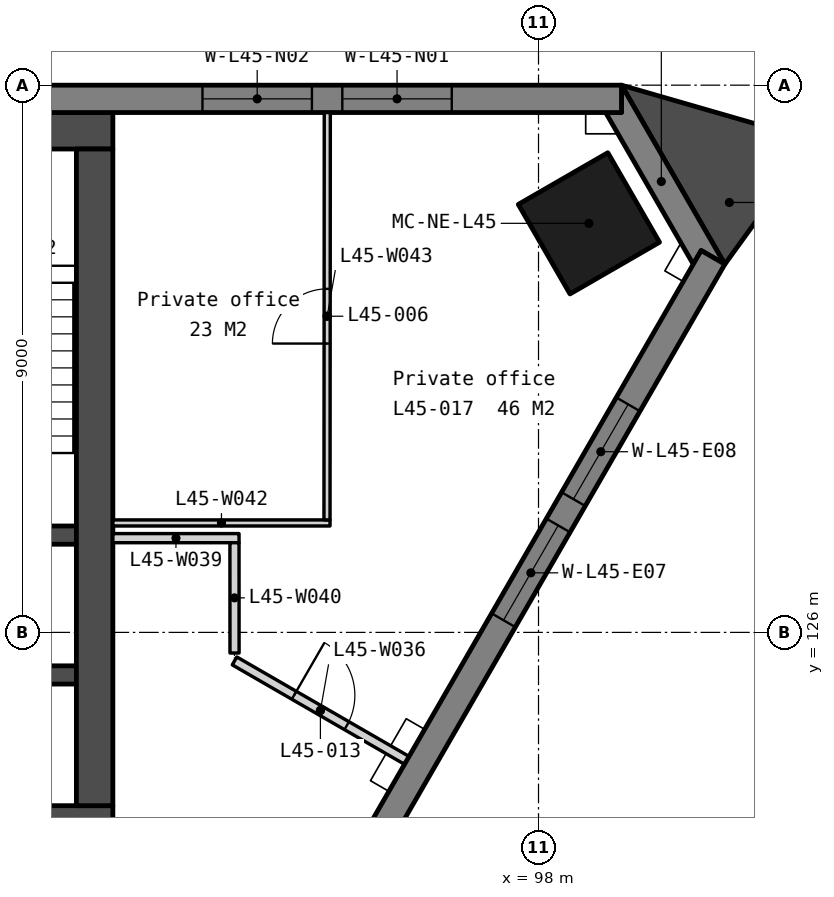
"""IFC4 building model, lengths in metres.
Left out: names, types, materials, properties, quantities, classifications, styles, units other than length and angle.
Written with IfcOpenShell. Run it as: python <this file> out.ifc"""

import sys

from ifc_helpers import new_model, si_unit, direction, frame, frame_2d, origin, origin_2d, place, context, subcontext, project, spatial, polyline, rectangle, outline, extrude, element, fill, save


model = new_model("IFC4")
c1 = context("Model", 3, precision=1e-05, world=origin(), true_north=direction((0.0, 1.0)))
c2 = subcontext(c1, "Body", "Model", "MODEL_VIEW")
j1 = project(units=[si_unit("LENGTHUNIT", "METRE"), si_unit("PLANEANGLEUNIT", "RADIAN")], contexts=[c1])
p1 = place(None, origin())
s1 = spatial("IfcSite", under=j1, at=p1, CompositionType="ELEMENT")
p2 = place(p1, origin())
s2 = spatial("IfcBuilding", under=s1, at=p2, CompositionType="ELEMENT")
p3 = place(p2, frame((0.0, 0.0, 180.2)))
s3 = spatial("IfcBuildingStorey", under=s2, at=p3, CompositionType="ELEMENT", Elevation=180.2)
p4 = place(p3, frame((98.829, 132.728, 0.0), z_axis=(0.0, 0.0, 1.0), x_axis=(-0.5, 0.866025403784, 0.0)))
e1 = element("IfcColumn", 1, at=p4, inside=s3, PredefinedType="COLUMN", context=c2, shape_type="SweptSolid", body=[
    extrude(rectangle(XDim=1.7, YDim=1.7, at=origin_2d()), origin(), (0.0, 0.0, 1.0), 3.9),
])
p5 = place(p3, frame((69.0, 134.25, 0.0), z_axis=(0.0, 0.0, 1.0), x_axis=(1.0, 0.0, 0.0)))
e2 = element("IfcWall", 2, at=p5, inside=s3, PredefinedType="SOLIDWALL", context=c2, shape_type="SweptSolid", body=[
    extrude(rectangle(XDim=22.0, YDim=0.6, at=frame_2d((11.0, 0.0))), origin(), (0.0, 0.0, 1.0), 3.75),
])
p6 = place(p3, frame((69.0, 122.85, 0.0), z_axis=(0.0, 0.0, 1.0), x_axis=(1.0, 0.0, 0.0)))
e3 = element("IfcWall", 3, at=p6, inside=s3, PredefinedType="SOLIDWALL", context=c2, shape_type="SweptSolid", body=[
    extrude(rectangle(XDim=22.0, YDim=0.6, at=frame_2d((11.0, 0.0))), origin(), (0.0, 0.0, 1.0), 3.75),
])
p7 = place(p6, frame((16.375, 0.0, 0.0)))
e4 = element("IfcOpeningElement", 4, at=p7, cuts=e3, PredefinedType="OPENING", context=c2, shape_type="SweptSolid", body=[
    extrude(rectangle(XDim=1.8, YDim=2.1, at=frame_2d((0.9, 1.05))), frame((0.0, 0.31, 0.0), z_axis=(0.0, -1.0, 0.0), x_axis=(1.0, 0.0, 0.0)), (0.0, 0.0, 1.0), 0.62),
])
p8 = place(p6, frame((3.825, 0.0, 0.0)))
e5 = element("IfcOpeningElement", 5, at=p8, cuts=e3, PredefinedType="OPENING", context=c2, shape_type="SweptSolid", body=[
    extrude(rectangle(XDim=1.8, YDim=2.1, at=frame_2d((0.9, 1.05))), frame((0.0, 0.31, 0.0), z_axis=(0.0, -1.0, 0.0), x_axis=(1.0, 0.0, 0.0)), (0.0, 0.0, 1.0), 0.62),
])
p9 = place(p6, frame((12.85, 0.0, 0.0)))
e6 = element("IfcOpeningElement", 6, at=p9, cuts=e3, PredefinedType="OPENING", context=c2, shape_type="SweptSolid", body=[
    extrude(rectangle(XDim=1.5, YDim=2.1, at=frame_2d((0.75, 1.05))), frame((0.0, 0.31, 0.0), z_axis=(0.0, -1.0, 0.0), x_axis=(1.0, 0.0, 0.0)), (0.0, 0.0, 1.0), 0.62),
])
for number, where, z_axis, x_axis in (
    (7, (87.85, 127.6, 0.0), (0.0, 0.0, 1.0), (1.0, 0.0, 0.0)),
    (8, (87.85, 125.3, 0.0), (0.0, 0.0, 1.0), (1.0, 0.0, 0.0)),
):
    element("IfcWall", number, at=place(p3, frame(where, z_axis=z_axis, x_axis=x_axis)), inside=s3, PredefinedType="SOLIDWALL", context=c2, shape_type="SweptSolid", body=[
        extrude(rectangle(XDim=2.55, YDim=0.3, at=frame_2d((1.275, 0.0))), origin(), (0.0, 0.0, 1.0), 3.75),
    ])
p10 = place(p3, frame((90.7, 133.95, 0.0), z_axis=(0.0, 0.0, 1.0), x_axis=(0.0, -1.0, 0.0)))
e9 = element("IfcWall", 9, at=p10, inside=s3, PredefinedType="SOLIDWALL", context=c2, shape_type="SweptSolid", body=[
    extrude(rectangle(XDim=10.8, YDim=0.6, at=frame_2d((5.4, 0.0))), origin(), (0.0, 0.0, 1.0), 3.75),
])
p11 = place(p3, frame((0.0, 0.0, -0.45)))
e10 = element("IfcWall", 10, at=p11, inside=s3, PredefinedType="SOLIDWALL", context=c2, shape_type="SweptSolid", body=[
    extrude(outline(polyline([(101.065, 132.055), (100.675, 132.281), (100.545, 132.055), (99.105, 134.55), (99.365, 134.55), (99.365, 135.0), (101.065, 132.055)])), origin(), (0.0, 0.0, 1.0), 4.2),
])
p12 = place(p3, frame((99.365, 134.775, -0.45), z_axis=(0.0, 0.0, 1.0), x_axis=(-1.0, 0.0, 0.0)))
e11 = element("IfcWall", 11, at=p12, inside=s3, PredefinedType="SOLIDWALL", context=c2, shape_type="SweptSolid", body=[
    extrude(outline(polyline([(38.729, 0.0), (38.729, 4.2), (0.0, 4.2), (0.0, 0.0), (38.729, 0.0)])), frame((0.0, 0.225, 0.0), z_axis=(0.0, -1.0, 0.0), x_axis=(1.0, 0.0, 0.0)), (0.0, 0.0, 1.0), 0.45),
])
p13 = place(p12, frame((2.791, 0.0, 1.25)))
e12 = element("IfcOpeningElement", 12, at=p13, cuts=e11, PredefinedType="OPENING", context=c2, shape_type="SweptSolid", body=[
    extrude(rectangle(XDim=1.8, YDim=2.2, at=frame_2d((0.9, 1.1))), frame((0.0, 0.235, 0.0), z_axis=(0.0, -1.0, 0.0), x_axis=(1.0, 0.0, 0.0)), (0.0, 0.0, 1.0), 0.47),
])
p14 = place(p12, frame((5.091, 0.0, 1.25)))
e13 = element("IfcOpeningElement", 13, at=p14, cuts=e11, PredefinedType="OPENING", context=c2, shape_type="SweptSolid", body=[
    extrude(rectangle(XDim=1.8, YDim=2.2, at=frame_2d((0.9, 1.1))), frame((0.0, 0.235, 0.0), z_axis=(0.0, -1.0, 0.0), x_axis=(1.0, 0.0, 0.0)), (0.0, 0.0, 1.0), 0.47),
])
p15 = place(p12, frame((12.473, 0.0, 1.25)))
e14 = element("IfcOpeningElement", 14, at=p15, cuts=e11, PredefinedType="OPENING", context=c2, shape_type="SweptSolid", body=[
    extrude(rectangle(XDim=1.8, YDim=2.2, at=frame_2d((0.9, 1.1))), frame((0.0, 0.235, 0.0), z_axis=(0.0, -1.0, 0.0), x_axis=(1.0, 0.0, 0.0)), (0.0, 0.0, 1.0), 0.47),
])
p16 = place(p12, frame((14.773, 0.0, 1.25)))
e15 = element("IfcOpeningElement", 15, at=p16, cuts=e11, PredefinedType="OPENING", context=c2, shape_type="SweptSolid", body=[
    extrude(rectangle(XDim=1.8, YDim=2.2, at=frame_2d((0.9, 1.1))), frame((0.0, 0.235, 0.0), z_axis=(0.0, -1.0, 0.0), x_axis=(1.0, 0.0, 0.0)), (0.0, 0.0, 1.0), 0.47),
])
p17 = place(p12, frame((22.156, 0.0, 1.25)))
e16 = element("IfcOpeningElement", 16, at=p17, cuts=e11, PredefinedType="OPENING", context=c2, shape_type="SweptSolid", body=[
    extrude(rectangle(XDim=1.8, YDim=2.2, at=frame_2d((0.9, 1.1))), frame((0.0, 0.235, 0.0), z_axis=(0.0, -1.0, 0.0), x_axis=(1.0, 0.0, 0.0)), (0.0, 0.0, 1.0), 0.47),
])
p18 = place(p12, frame((24.456, 0.0, 1.25)))
e17 = element("IfcOpeningElement", 17, at=p18, cuts=e11, PredefinedType="OPENING", context=c2, shape_type="SweptSolid", body=[
    extrude(rectangle(XDim=1.8, YDim=2.2, at=frame_2d((0.9, 1.1))), frame((0.0, 0.235, 0.0), z_axis=(0.0, -1.0, 0.0), x_axis=(1.0, 0.0, 0.0)), (0.0, 0.0, 1.0), 0.47),
])
p19 = place(p12, frame((31.838, 0.0, 1.25)))
e18 = element("IfcOpeningElement", 18, at=p19, cuts=e11, PredefinedType="OPENING", context=c2, shape_type="SweptSolid", body=[
    extrude(rectangle(XDim=1.8, YDim=2.2, at=frame_2d((0.9, 1.1))), frame((0.0, 0.235, 0.0), z_axis=(0.0, -1.0, 0.0), x_axis=(1.0, 0.0, 0.0)), (0.0, 0.0, 1.0), 0.47),
])
p20 = place(p12, frame((34.138, 0.0, 1.25)))
e19 = element("IfcOpeningElement", 19, at=p20, cuts=e11, PredefinedType="OPENING", context=c2, shape_type="SweptSolid", body=[
    extrude(rectangle(XDim=1.8, YDim=2.2, at=frame_2d((0.9, 1.1))), frame((0.0, 0.235, 0.0), z_axis=(0.0, -1.0, 0.0), x_axis=(1.0, 0.0, 0.0)), (0.0, 0.0, 1.0), 0.47),
])
p21 = place(p3, frame((81.505, 98.627, -0.45), z_axis=(0.0, 0.0, 1.0), x_axis=(0.500002199942, 0.866024133644, 0.0)))
e20 = element("IfcWall", 20, at=p21, inside=s3, PredefinedType="SOLIDWALL", context=c2, shape_type="SweptSolid", body=[
    extrude(outline(polyline([(38.729, 0.0), (38.729, 4.2), (0.0, 4.2), (0.0, 0.0), (38.729, 0.0)])), frame((0.0, 0.225, 0.0), z_axis=(0.0, -1.0, 0.0), x_axis=(1.0, 0.0, 0.0)), (0.0, 0.0, 1.0), 0.45),
])
p22 = place(p21, frame((2.791, 0.0, 1.25)))
e21 = element("IfcOpeningElement", 21, at=p22, cuts=e20, PredefinedType="OPENING", context=c2, shape_type="SweptSolid", body=[
    extrude(rectangle(XDim=1.8, YDim=2.2, at=frame_2d((0.9, 1.1))), frame((0.0, 0.235, 0.0), z_axis=(0.0, -1.0, 0.0), x_axis=(1.0, 0.0, 0.0)), (0.0, 0.0, 1.0), 0.47),
])
p23 = place(p21, frame((5.091, 0.0, 1.25)))
e22 = element("IfcOpeningElement", 22, at=p23, cuts=e20, PredefinedType="OPENING", context=c2, shape_type="SweptSolid", body=[
    extrude(rectangle(XDim=1.8, YDim=2.2, at=frame_2d((0.9, 1.1))), frame((0.0, 0.235, 0.0), z_axis=(0.0, -1.0, 0.0), x_axis=(1.0, 0.0, 0.0)), (0.0, 0.0, 1.0), 0.47),
])
p24 = place(p21, frame((12.473, 0.0, 1.25)))
e23 = element("IfcOpeningElement", 23, at=p24, cuts=e20, PredefinedType="OPENING", context=c2, shape_type="SweptSolid", body=[
    extrude(rectangle(XDim=1.8, YDim=2.2, at=frame_2d((0.9, 1.1))), frame((0.0, 0.235, 0.0), z_axis=(0.0, -1.0, 0.0), x_axis=(1.0, 0.0, 0.0)), (0.0, 0.0, 1.0), 0.47),
])
p25 = place(p21, frame((14.773, 0.0, 1.25)))
e24 = element("IfcOpeningElement", 24, at=p25, cuts=e20, PredefinedType="OPENING", context=c2, shape_type="SweptSolid", body=[
    extrude(rectangle(XDim=1.8, YDim=2.2, at=frame_2d((0.9, 1.1))), frame((0.0, 0.235, 0.0), z_axis=(0.0, -1.0, 0.0), x_axis=(1.0, 0.0, 0.0)), (0.0, 0.0, 1.0), 0.47),
])
p26 = place(p21, frame((22.156, 0.0, 1.25)))
e25 = element("IfcOpeningElement", 25, at=p26, cuts=e20, PredefinedType="OPENING", context=c2, shape_type="SweptSolid", body=[
    extrude(rectangle(XDim=1.8, YDim=2.2, at=frame_2d((0.9, 1.1))), frame((0.0, 0.235, 0.0), z_axis=(0.0, -1.0, 0.0), x_axis=(1.0, 0.0, 0.0)), (0.0, 0.0, 1.0), 0.47),
])
p27 = place(p21, frame((24.456, 0.0, 1.25)))
e26 = element("IfcOpeningElement", 26, at=p27, cuts=e20, PredefinedType="OPENING", context=c2, shape_type="SweptSolid", body=[
    extrude(rectangle(XDim=1.8, YDim=2.2, at=frame_2d((0.9, 1.1))), frame((0.0, 0.235, 0.0), z_axis=(0.0, -1.0, 0.0), x_axis=(1.0, 0.0, 0.0)), (0.0, 0.0, 1.0), 0.47),
])
p28 = place(p21, frame((31.838, 0.0, 1.25)))
e27 = element("IfcOpeningElement", 27, at=p28, cuts=e20, PredefinedType="OPENING", context=c2, shape_type="SweptSolid", body=[
    extrude(rectangle(XDim=1.8, YDim=2.2, at=frame_2d((0.9, 1.1))), frame((0.0, 0.235, 0.0), z_axis=(0.0, -1.0, 0.0), x_axis=(1.0, 0.0, 0.0)), (0.0, 0.0, 1.0), 0.47),
])
p29 = place(p21, frame((34.138, 0.0, 1.25)))
e28 = element("IfcOpeningElement", 28, at=p29, cuts=e20, PredefinedType="OPENING", context=c2, shape_type="SweptSolid", body=[
    extrude(rectangle(XDim=1.8, YDim=2.2, at=frame_2d((0.9, 1.1))), frame((0.0, 0.235, 0.0), z_axis=(0.0, -1.0, 0.0), x_axis=(1.0, 0.0, 0.0)), (0.0, 0.0, 1.0), 0.47),
])
p30 = place(p3, frame((0.0, 0.0, -0.45)))
e29 = element("IfcWall", 29, at=p30, inside=s3, PredefinedType="SOLIDWALL", context=c2, shape_type="SweptSolid", body=[
    extrude(outline(polyline([(101.065, 132.055), (102.534, 134.086), (99.365, 135.0), (101.065, 132.055)])), origin(), (0.0, 0.0, 1.0), 4.2),
])
p31 = place(p3, frame((93.001, 125.531, 0.0), z_axis=(0.0, 0.0, 1.0), x_axis=(0.866032230194, -0.499988176125, 0.0)))
e30 = element("IfcWall", 30, at=p31, inside=s3, PredefinedType="PARTITIONING", context=c2, shape_type="SweptSolid", body=[
    extrude(rectangle(XDim=3.261, YDim=0.15, at=frame_2d((1.63, 0.0))), origin(), (0.0, 0.0, 1.0), 3.75),
])
p32 = place(p31, frame((1.13, 0.0, 0.0)))
e31 = element("IfcOpeningElement", 31, at=p32, cuts=e30, PredefinedType="OPENING", context=c2, shape_type="SweptSolid", body=[
    extrude(rectangle(XDim=1.0, YDim=2.1, at=frame_2d((0.5, 1.05))), frame((0.0, 0.085, 0.0), z_axis=(0.0, -1.0, 0.0), x_axis=(1.0, 0.0, 0.0)), (0.0, 0.0, 1.0), 0.17),
])
p33 = place(p3, frame((91.0, 127.55, 0.0), z_axis=(0.0, 0.0, 1.0), x_axis=(1.0, 0.0, 0.0)))
e32 = element("IfcWall", 32, at=p33, inside=s3, PredefinedType="PARTITIONING", context=c2, shape_type="SweptSolid", body=[
    extrude(rectangle(XDim=2.075, YDim=0.15, at=frame_2d((1.038, 0.0))), origin(), (0.0, 0.0, 1.0), 3.75),
])
p34 = place(p3, frame((93.001, 125.661, 0.0), z_axis=(0.0, 0.0, 1.0), x_axis=(-0.000538285483, 0.999999855124, 0.0)))
e33 = element("IfcWall", 33, at=p34, inside=s3, PredefinedType="PARTITIONING", context=c2, shape_type="SweptSolid", body=[
    extrude(rectangle(XDim=1.814, YDim=0.15, at=frame_2d((0.907, 0.0))), origin(), (0.0, 0.0, 1.0), 3.75),
])
p35 = place(p3, frame((91.0, 127.8, 0.0), z_axis=(0.0, 0.0, 1.0), x_axis=(1.0, 0.0, 0.0)))
e34 = element("IfcWall", 34, at=p35, inside=s3, PredefinedType="PARTITIONING", context=c2, shape_type="SweptSolid", body=[
    extrude(rectangle(XDim=3.572, YDim=0.1, at=frame_2d((1.786, 0.0))), origin(), (0.0, 0.0, 1.0), 3.28),
])
p36 = place(p3, frame((94.521, 127.85, 0.0), z_axis=(0.0, 0.0, 1.0), x_axis=(0.000728783103, 0.999999734438, 0.0)))
e35 = element("IfcWall", 35, at=p36, inside=s3, PredefinedType="PARTITIONING", context=c2, shape_type="SweptSolid", body=[
    extrude(rectangle(XDim=6.7, YDim=0.1, at=frame_2d((3.35, 0.0))), origin(), (0.0, 0.0, 1.0), 3.75),
])
p37 = place(p36, frame((2.9, 0.0, 0.0)))
e36 = element("IfcOpeningElement", 36, at=p37, cuts=e35, PredefinedType="OPENING", context=c2, shape_type="SweptSolid", body=[
    extrude(rectangle(XDim=0.9, YDim=2.1, at=frame_2d((0.45, 1.05))), frame((0.0, 0.06, 0.0), z_axis=(0.0, -1.0, 0.0), x_axis=(1.0, 0.0, 0.0)), (0.0, 0.0, 1.0), 0.12),
])
p38 = place(p13, origin())
e37 = element("IfcWindow", 37, at=p38, inside=s3, PartitioningType="SINGLE_PANEL", PredefinedType="WINDOW", context=c2, shape_type="SweptSolid", body=[
    extrude(rectangle(XDim=1.8, YDim=2.2, at=frame_2d((0.9, 1.1))), frame((0.0, 0.03, 0.0), z_axis=(0.0, -1.0, 0.0), x_axis=(1.0, 0.0, 0.0)), (0.0, 0.0, 1.0), 0.06),
])
fill(e12, e37)
p39 = place(p14, origin())
e38 = element("IfcWindow", 38, at=p39, inside=s3, PartitioningType="SINGLE_PANEL", PredefinedType="WINDOW", context=c2, shape_type="SweptSolid", body=[
    extrude(rectangle(XDim=1.8, YDim=2.2, at=frame_2d((0.9, 1.1))), frame((0.0, 0.03, 0.0), z_axis=(0.0, -1.0, 0.0), x_axis=(1.0, 0.0, 0.0)), (0.0, 0.0, 1.0), 0.06),
])
fill(e13, e38)
p40 = place(p28, origin())
e39 = element("IfcWindow", 39, at=p40, inside=s3, PartitioningType="SINGLE_PANEL", PredefinedType="WINDOW", context=c2, shape_type="SweptSolid", body=[
    extrude(rectangle(XDim=1.8, YDim=2.2, at=frame_2d((0.9, 1.1))), frame((0.0, 0.03, 0.0), z_axis=(0.0, -1.0, 0.0), x_axis=(1.0, 0.0, 0.0)), (0.0, 0.0, 1.0), 0.06),
])
fill(e27, e39)
p41 = place(p29, origin())
e40 = element("IfcWindow", 40, at=p41, inside=s3, PartitioningType="SINGLE_PANEL", PredefinedType="WINDOW", context=c2, shape_type="SweptSolid", body=[
    extrude(rectangle(XDim=1.8, YDim=2.2, at=frame_2d((0.9, 1.1))), frame((0.0, 0.03, 0.0), z_axis=(0.0, -1.0, 0.0), x_axis=(1.0, 0.0, 0.0)), (0.0, 0.0, 1.0), 0.06),
])
fill(e28, e40)
p42 = place(p37, origin())
e41 = element("IfcDoor", 41, at=p42, inside=s3, OperationType="SINGLE_SWING_LEFT", PredefinedType="DOOR", context=c2, shape_type="SweptSolid", body=[
    extrude(rectangle(XDim=0.9, YDim=2.1, at=frame_2d((0.45, 1.05))), frame((0.0, 0.025, 0.0), z_axis=(0.0, -1.0, 0.0), x_axis=(1.0, 0.0, 0.0)), (0.0, 0.0, 1.0), 0.05),
])
fill(e36, e41)
p43 = place(p32, origin())
e42 = element("IfcDoor", 42, at=p43, inside=s3, OperationType="SINGLE_SWING_LEFT", PredefinedType="DOOR", context=c2, shape_type="SweptSolid", body=[
    extrude(rectangle(XDim=1.0, YDim=2.1, at=frame_2d((0.5, 1.05))), frame((0.0, 0.025, 0.0), z_axis=(0.0, -1.0, 0.0), x_axis=(1.0, 0.0, 0.0)), (0.0, 0.0, 1.0), 0.05),
])
fill(e31, e42)
save(model, sys.argv[1])
